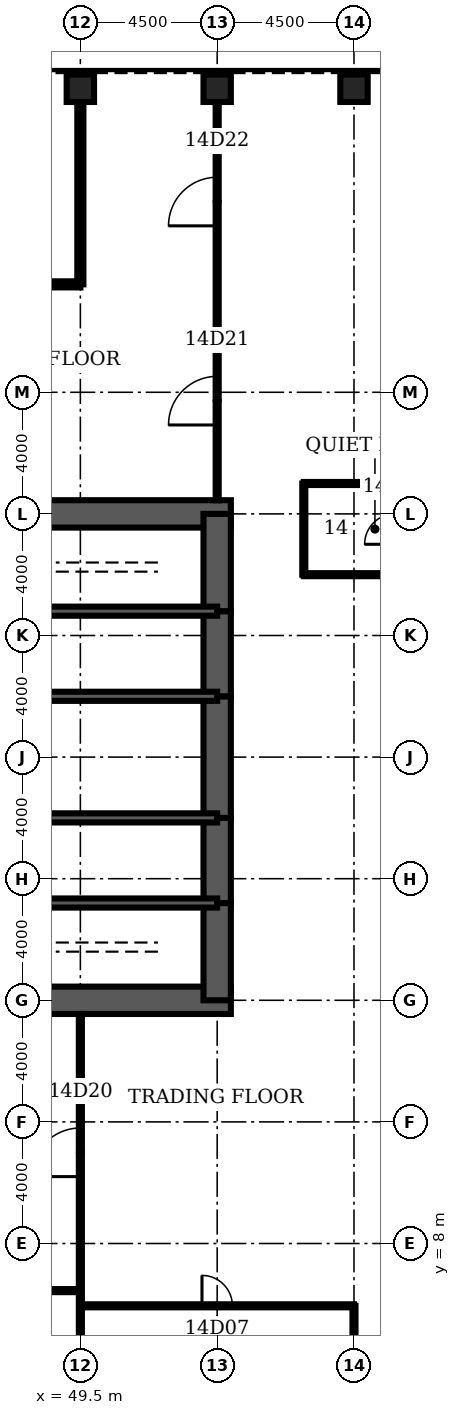
"""IFC4 building model, lengths in metres.
Left out: names, types, materials, properties, quantities, classifications, styles, units other than length and angle.
Written with IfcOpenShell. Run it as: python <this file> out.ifc"""

import sys

from ifc_helpers import new_model, si_unit, direction, frame, frame_2d, origin, origin_2d, place, context, subcontext, project, spatial, rectangle, hollow_rectangle, extrude, element, fill, save


model = new_model("IFC4")
c1 = context("Model", 3, precision=1e-05, world=origin(), true_north=direction((0.0, 1.0)))
c2 = subcontext(c1, "Body", "Model", "MODEL_VIEW")
j1 = project(units=[si_unit("LENGTHUNIT", "METRE"), si_unit("PLANEANGLEUNIT", "RADIAN")], contexts=[c1])
p1 = place(None, origin())
s1 = spatial("IfcSite", under=j1, at=p1, CompositionType="ELEMENT")
p2 = place(p1, origin())
s2 = spatial("IfcBuilding", under=s1, at=p2, CompositionType="ELEMENT")
p3 = place(p2, frame((0.0, 0.0, 68.0)))
s3 = spatial("IfcBuildingStorey", under=s2, at=p3, CompositionType="ELEMENT", Elevation=68.0)
for number, where, z_axis, x_axis in (
    (1, (58.5, 46.0, 0.0), (0.0, 0.0, 1.0), (0.0, 1.0, 0.0)),
    (2, (54.0, 46.0, 0.0), (0.0, 0.0, 1.0), (0.0, 1.0, 0.0)),
    (3, (49.5, 46.0, 0.0), (0.0, 0.0, 1.0), (0.0, 1.0, 0.0)),
):
    element("IfcColumn", number, at=place(p3, frame(where, z_axis=z_axis, x_axis=x_axis)), inside=s3, PredefinedType="COLUMN", context=c2, shape_type="SweptSolid", body=[
        extrude(hollow_rectangle(XDim=0.9, YDim=0.9, WallThickness=0.12, at=origin_2d()), origin(), (0.0, 0.0, 1.0), 4.5),
    ])
for number, where, z_axis, x_axis in (
    (4, (45.0, 16.0, 0.0), (0.0, 0.0, 1.0), (1.0, 0.0, 0.0)),
    (5, (54.45, 32.0, 0.0), (0.0, 0.0, 1.0), (-1.0, 0.0, 0.0)),
):
    element("IfcWall", number, at=place(p3, frame(where, z_axis=z_axis, x_axis=x_axis)), inside=s3, PredefinedType="SHEAR", context=c2, shape_type="SweptSolid", body=[
        extrude(rectangle(XDim=9.45, YDim=0.9, at=frame_2d((4.725, 0.0))), origin(), (0.0, 0.0, 1.0), 4.5),
    ])
p4 = place(p3, frame((54.0, 16.0, 0.0), z_axis=(0.0, 0.0, 1.0), x_axis=(0.0, 1.0, 0.0)))
e6 = element("IfcWall", 6, at=p4, inside=s3, PredefinedType="SHEAR", context=c2, shape_type="SweptSolid", body=[
    extrude(rectangle(XDim=3.2, YDim=0.9, at=frame_2d((1.6, 0.0))), origin(), (0.0, 0.0, 1.0), 4.5),
])
p5 = place(p3, frame((54.0, 19.2, 0.0), z_axis=(0.0, 0.0, 1.0), x_axis=(0.0, 1.0, 0.0)))
e7 = element("IfcWall", 7, at=p5, inside=s3, PredefinedType="SHEAR", context=c2, shape_type="SweptSolid", body=[
    extrude(rectangle(XDim=2.8, YDim=0.9, at=frame_2d((1.4, 0.0))), origin(), (0.0, 0.0, 1.0), 4.5),
])
p6 = place(p5, frame((0.4, 0.0, 0.0)))
e8 = element("IfcOpeningElement", 8, at=p6, cuts=e7, PredefinedType="OPENING", context=c2, shape_type="SweptSolid", body=[
    extrude(rectangle(XDim=1.8, YDim=2.1, at=frame_2d((0.9, 1.05))), frame((0.0, 0.46, 0.0), z_axis=(0.0, -1.0, 0.0), x_axis=(1.0, 0.0, 0.0)), (0.0, 0.0, 1.0), 0.92),
])
p7 = place(p3, frame((54.0, 22.0, 0.0), z_axis=(0.0, 0.0, 1.0), x_axis=(0.0, 1.0, 0.0)))
e9 = element("IfcWall", 9, at=p7, inside=s3, PredefinedType="SHEAR", context=c2, shape_type="SweptSolid", body=[
    extrude(rectangle(XDim=4.0, YDim=0.9, at=frame_2d((2.0, 0.0))), origin(), (0.0, 0.0, 1.0), 4.5),
])
p8 = place(p3, frame((54.0, 26.0, 0.0), z_axis=(0.0, 0.0, 1.0), x_axis=(0.0, 1.0, 0.0)))
e10 = element("IfcWall", 10, at=p8, inside=s3, PredefinedType="SHEAR", context=c2, shape_type="SweptSolid", body=[
    extrude(rectangle(XDim=2.8, YDim=0.9, at=frame_2d((1.4, 0.0))), origin(), (0.0, 0.0, 1.0), 4.5),
])
p9 = place(p8, frame((0.6, 0.0, 0.0)))
e11 = element("IfcOpeningElement", 11, at=p9, cuts=e10, PredefinedType="OPENING", context=c2, shape_type="SweptSolid", body=[
    extrude(rectangle(XDim=1.8, YDim=2.1, at=frame_2d((0.9, 1.05))), frame((0.0, 0.46, 0.0), z_axis=(0.0, -1.0, 0.0), x_axis=(1.0, 0.0, 0.0)), (0.0, 0.0, 1.0), 0.92),
])
p10 = place(p3, frame((54.0, 28.8, 0.0), z_axis=(0.0, 0.0, 1.0), x_axis=(0.0, 1.0, 0.0)))
e12 = element("IfcWall", 12, at=p10, inside=s3, PredefinedType="SHEAR", context=c2, shape_type="SweptSolid", body=[
    extrude(rectangle(XDim=3.2, YDim=0.9, at=frame_2d((1.6, 0.0))), origin(), (0.0, 0.0, 1.0), 4.5),
])
p11 = place(p3, frame((45.0, 19.2, 0.0), z_axis=(0.0, 0.0, 1.0), x_axis=(1.0, 0.0, 0.0)))
e13 = element("IfcWall", 13, at=p11, inside=s3, PredefinedType="SOLIDWALL", context=c2, shape_type="SweptSolid", body=[
    extrude(rectangle(XDim=9.0, YDim=0.3, at=frame_2d((4.5, 0.0))), origin(), (0.0, 0.0, 1.0), 4.5),
])
p12 = place(p11, frame((7.35, 0.0, 0.0)))
e14 = element("IfcOpeningElement", 14, at=p12, cuts=e13, PredefinedType="OPENING", context=c2, shape_type="SweptSolid", body=[
    extrude(rectangle(XDim=1.0, YDim=2.1, at=frame_2d((0.5, 1.05))), frame((0.0, 0.16, 0.0), z_axis=(0.0, -1.0, 0.0), x_axis=(1.0, 0.0, 0.0)), (0.0, 0.0, 1.0), 0.32),
])
p13 = place(p3, frame((45.0, 28.8, 0.0), z_axis=(0.0, 0.0, 1.0), x_axis=(1.0, 0.0, 0.0)))
e15 = element("IfcWall", 15, at=p13, inside=s3, PredefinedType="SOLIDWALL", context=c2, shape_type="SweptSolid", body=[
    extrude(rectangle(XDim=9.0, YDim=0.3, at=frame_2d((4.5, 0.0))), origin(), (0.0, 0.0, 1.0), 4.5),
])
p14 = place(p13, frame((7.35, 0.0, 0.0)))
e16 = element("IfcOpeningElement", 16, at=p14, cuts=e15, PredefinedType="OPENING", context=c2, shape_type="SweptSolid", body=[
    extrude(rectangle(XDim=1.0, YDim=2.1, at=frame_2d((0.5, 1.05))), frame((0.0, 0.16, 0.0), z_axis=(0.0, -1.0, 0.0), x_axis=(1.0, 0.0, 0.0)), (0.0, 0.0, 1.0), 0.32),
])
p15 = place(p3, frame((48.0, 22.0, 0.0), z_axis=(0.0, 0.0, 1.0), x_axis=(1.0, 0.0, 0.0)))
e17 = element("IfcWall", 17, at=p15, inside=s3, PredefinedType="SOLIDWALL", context=c2, shape_type="SweptSolid", body=[
    extrude(rectangle(XDim=6.0, YDim=0.3, at=frame_2d((3.0, 0.0))), origin(), (0.0, 0.0, 1.0), 4.5),
])
p16 = place(p15, frame((2.0, 0.0, 0.0)))
e18 = element("IfcOpeningElement", 18, at=p16, cuts=e17, PredefinedType="OPENING", context=c2, shape_type="SweptSolid", body=[
    extrude(rectangle(XDim=1.0, YDim=2.1, at=frame_2d((0.5, 1.05))), frame((0.0, 0.16, 0.0), z_axis=(0.0, -1.0, 0.0), x_axis=(1.0, 0.0, 0.0)), (0.0, 0.0, 1.0), 0.32),
])
p17 = place(p15, frame((4.0, 0.0, 0.0)))
e19 = element("IfcOpeningElement", 19, at=p17, cuts=e17, PredefinedType="OPENING", context=c2, shape_type="SweptSolid", body=[
    extrude(rectangle(XDim=1.0, YDim=2.1, at=frame_2d((0.5, 1.05))), frame((0.0, 0.16, 0.0), z_axis=(0.0, -1.0, 0.0), x_axis=(1.0, 0.0, 0.0)), (0.0, 0.0, 1.0), 0.32),
])
p18 = place(p3, frame((48.0, 26.0, 0.0), z_axis=(0.0, 0.0, 1.0), x_axis=(1.0, 0.0, 0.0)))
e20 = element("IfcWall", 20, at=p18, inside=s3, PredefinedType="SOLIDWALL", context=c2, shape_type="SweptSolid", body=[
    extrude(rectangle(XDim=6.0, YDim=0.3, at=frame_2d((3.0, 0.0))), origin(), (0.0, 0.0, 1.0), 4.5),
])
p19 = place(p3, frame((51.375, 22.15, 0.0), z_axis=(0.0, 0.0, 1.0), x_axis=(0.0, 1.0, 0.0)))
e21 = element("IfcWall", 21, at=p19, inside=s3, PredefinedType="PARTITIONING", context=c2, shape_type="SweptSolid", body=[
    extrude(rectangle(XDim=3.7, YDim=0.15, at=frame_2d((1.85, 0.0))), origin(), (0.0, 0.0, 1.0), 3.0),
])
p20 = place(p3, frame((49.5, 5.95, 0.0), z_axis=(0.0, 0.0, 1.0), x_axis=(1.0, 0.0, 0.0)))
e22 = element("IfcWall", 22, at=p20, inside=s3, PredefinedType="PARTITIONING", context=c2, shape_type="SweptSolid", body=[
    extrude(rectangle(XDim=9.0, YDim=0.1, at=frame_2d((4.5, 0.0))), origin(), (0.0, 0.0, 1.0), 3.0),
])
p21 = place(p20, frame((4.0, 0.0, 0.0)))
e23 = element("IfcOpeningElement", 23, at=p21, cuts=e22, PredefinedType="OPENING", context=c2, shape_type="SweptSolid", body=[
    extrude(rectangle(XDim=1.0, YDim=2.1, at=frame_2d((0.5, 1.05))), frame((0.0, 0.06, 0.0), z_axis=(0.0, -1.0, 0.0), x_axis=(1.0, 0.0, 0.0)), (0.0, 0.0, 1.0), 0.12),
])
p22 = place(p3, frame((36.0, 6.45, 0.0), z_axis=(0.0, 0.0, 1.0), x_axis=(1.0, 0.0, 0.0)))
e24 = element("IfcWall", 24, at=p22, inside=s3, PredefinedType="PARTITIONING", context=c2, shape_type="SweptSolid", body=[
    extrude(rectangle(XDim=13.5, YDim=0.1, at=frame_2d((6.75, 0.0))), origin(), (0.0, 0.0, 1.0), 3.0),
])
p23 = place(p22, frame((5.95, 0.0, 0.0)))
e25 = element("IfcOpeningElement", 25, at=p23, cuts=e24, PredefinedType="OPENING", context=c2, shape_type="SweptSolid", body=[
    extrude(rectangle(XDim=1.6, YDim=2.1, at=frame_2d((0.8, 1.05))), frame((0.0, 0.06, 0.0), z_axis=(0.0, -1.0, 0.0), x_axis=(1.0, 0.0, 0.0)), (0.0, 0.0, 1.0), 0.12),
])
for number, where, z_axis, x_axis in (
    (26, (56.85, 30.0, 0.0), (0.0, 0.0, 1.0), (1.0, 0.0, 0.0)),
    (27, (56.85, 33.0, 0.0), (0.0, 0.0, 1.0), (1.0, 0.0, 0.0)),
):
    element("IfcWall", number, at=place(p3, frame(where, z_axis=z_axis, x_axis=x_axis)), inside=s3, PredefinedType="PARTITIONING", context=c2, shape_type="SweptSolid", body=[
        extrude(rectangle(XDim=3.0, YDim=0.1, at=frame_2d((1.5, 0.0))), origin(), (0.0, 0.0, 1.0), 3.0),
    ])
p24 = place(p3, frame((40.5, 39.55, 0.0), z_axis=(0.0, 0.0, 1.0), x_axis=(1.0, 0.0, 0.0)))
e28 = element("IfcWall", 28, at=p24, inside=s3, PredefinedType="PARTITIONING", context=c2, shape_type="SweptSolid", body=[
    extrude(rectangle(XDim=9.0, YDim=0.2, at=frame_2d((4.5, 0.0))), origin(), (0.0, 0.0, 1.0), 3.0),
])
p25 = place(p24, frame((3.7, 0.0, 0.0)))
e29 = element("IfcOpeningElement", 29, at=p25, cuts=e28, PredefinedType="OPENING", context=c2, shape_type="SweptSolid", body=[
    extrude(rectangle(XDim=1.6, YDim=2.1, at=frame_2d((0.8, 1.05))), frame((0.0, 0.11, 0.0), z_axis=(0.0, -1.0, 0.0), x_axis=(1.0, 0.0, 0.0)), (0.0, 0.0, 1.0), 0.22),
])
p26 = place(p3, frame((49.5, 0.45, 0.0), z_axis=(0.0, 0.0, 1.0), x_axis=(0.0, 1.0, 0.0)))
e30 = element("IfcWall", 30, at=p26, inside=s3, PredefinedType="PARTITIONING", context=c2, shape_type="SweptSolid", body=[
    extrude(rectangle(XDim=15.1, YDim=0.1, at=frame_2d((7.55, 0.0))), origin(), (0.0, 0.0, 1.0), 3.0),
])
p27 = place(p26, frame((9.75, 0.0, 0.0)))
e31 = element("IfcOpeningElement", 31, at=p27, cuts=e30, PredefinedType="OPENING", context=c2, shape_type="SweptSolid", body=[
    extrude(rectangle(XDim=1.6, YDim=2.1, at=frame_2d((0.8, 1.05))), frame((0.0, 0.06, 0.0), z_axis=(0.0, -1.0, 0.0), x_axis=(1.0, 0.0, 0.0)), (0.0, 0.0, 1.0), 0.12),
])
p28 = place(p3, frame((49.5, 39.55, 0.0), z_axis=(0.0, 0.0, 1.0), x_axis=(0.0, 1.0, 0.0)))
e32 = element("IfcWall", 32, at=p28, inside=s3, PredefinedType="PARTITIONING", context=c2, shape_type="SweptSolid", body=[
    extrude(rectangle(XDim=6.0, YDim=0.2, at=frame_2d((3.0, 0.0))), origin(), (0.0, 0.0, 1.0), 3.0),
])
p29 = place(p3, frame((54.0, 32.45, 0.0), z_axis=(0.0, 0.0, 1.0), x_axis=(0.0, 1.0, 0.0)))
e33 = element("IfcWall", 33, at=p29, inside=s3, PredefinedType="PARTITIONING", context=c2, shape_type="SweptSolid", body=[
    extrude(rectangle(XDim=13.1, YDim=0.1, at=frame_2d((6.55, 0.0))), origin(), (0.0, 0.0, 1.0), 3.0),
])
p30 = place(p29, frame((2.475, 0.0, 0.0)))
e34 = element("IfcOpeningElement", 34, at=p30, cuts=e33, PredefinedType="OPENING", context=c2, shape_type="SweptSolid", body=[
    extrude(rectangle(XDim=1.6, YDim=2.1, at=frame_2d((0.8, 1.05))), frame((0.0, 0.06, 0.0), z_axis=(0.0, -1.0, 0.0), x_axis=(1.0, 0.0, 0.0)), (0.0, 0.0, 1.0), 0.12),
])
p31 = place(p29, frame((9.025, 0.0, 0.0)))
e35 = element("IfcOpeningElement", 35, at=p31, cuts=e33, PredefinedType="OPENING", context=c2, shape_type="SweptSolid", body=[
    extrude(rectangle(XDim=1.6, YDim=2.1, at=frame_2d((0.8, 1.05))), frame((0.0, 0.06, 0.0), z_axis=(0.0, -1.0, 0.0), x_axis=(1.0, 0.0, 0.0)), (0.0, 0.0, 1.0), 0.12),
])
p32 = place(p3, frame((56.85, 30.0, 0.0), z_axis=(0.0, 0.0, 1.0), x_axis=(0.0, 1.0, 0.0)))
e36 = element("IfcWall", 36, at=p32, inside=s3, PredefinedType="PARTITIONING", context=c2, shape_type="SweptSolid", body=[
    extrude(rectangle(XDim=3.0, YDim=0.1, at=frame_2d((1.5, 0.0))), origin(), (0.0, 0.0, 1.0), 3.0),
])
p33 = place(p3, frame((58.5, 0.45, 0.0), z_axis=(0.0, 0.0, 1.0), x_axis=(0.0, 1.0, 0.0)))
e37 = element("IfcWall", 37, at=p33, inside=s3, PredefinedType="PARTITIONING", context=c2, shape_type="SweptSolid", body=[
    extrude(rectangle(XDim=5.5, YDim=0.1, at=frame_2d((2.75, 0.0))), origin(), (0.0, 0.0, 1.0), 3.0),
])
p34 = place(p21, origin())
e38 = element("IfcDoor", 38, at=p34, inside=s3, OperationType="SINGLE_SWING_LEFT", PredefinedType="DOOR", context=c2, shape_type="SweptSolid", body=[
    extrude(rectangle(XDim=1.0, YDim=2.1, at=frame_2d((0.5, 1.05))), frame((0.0, 0.025, 0.0), z_axis=(0.0, -1.0, 0.0), x_axis=(1.0, 0.0, 0.0)), (0.0, 0.0, 1.0), 0.05),
])
fill(e23, e38)
p35 = place(p27, origin())
e39 = element("IfcDoor", 39, at=p35, inside=s3, OperationType="SINGLE_SWING_LEFT", PredefinedType="DOOR", context=c2, shape_type="SweptSolid", body=[
    extrude(rectangle(XDim=1.6, YDim=2.1, at=frame_2d((0.8, 1.05))), frame((0.0, 0.025, 0.0), z_axis=(0.0, -1.0, 0.0), x_axis=(1.0, 0.0, 0.0)), (0.0, 0.0, 1.0), 0.05),
])
fill(e31, e39)
p36 = place(p30, origin())
e40 = element("IfcDoor", 40, at=p36, inside=s3, OperationType="SINGLE_SWING_LEFT", PredefinedType="DOOR", context=c2, shape_type="SweptSolid", body=[
    extrude(rectangle(XDim=1.6, YDim=2.1, at=frame_2d((0.8, 1.05))), frame((0.0, 0.025, 0.0), z_axis=(0.0, -1.0, 0.0), x_axis=(1.0, 0.0, 0.0)), (0.0, 0.0, 1.0), 0.05),
])
fill(e34, e40)
p37 = place(p31, origin())
e41 = element("IfcDoor", 41, at=p37, inside=s3, OperationType="SINGLE_SWING_LEFT", PredefinedType="DOOR", context=c2, shape_type="SweptSolid", body=[
    extrude(rectangle(XDim=1.6, YDim=2.1, at=frame_2d((0.8, 1.05))), frame((0.0, 0.025, 0.0), z_axis=(0.0, -1.0, 0.0), x_axis=(1.0, 0.0, 0.0)), (0.0, 0.0, 1.0), 0.05),
])
fill(e35, e41)
p38 = place(p12, origin())
e42 = element("IfcDoor", 42, at=p38, inside=s3, OperationType="SINGLE_SWING_RIGHT", PredefinedType="DOOR", context=c2, shape_type="SweptSolid", body=[
    extrude(rectangle(XDim=1.0, YDim=2.1, at=frame_2d((0.5, 1.05))), frame((0.0, 0.025, 0.0), z_axis=(0.0, -1.0, 0.0), x_axis=(1.0, 0.0, 0.0)), (0.0, 0.0, 1.0), 0.05),
])
fill(e14, e42)
p39 = place(p14, origin())
e43 = element("IfcDoor", 43, at=p39, inside=s3, OperationType="SINGLE_SWING_RIGHT", PredefinedType="DOOR", context=c2, shape_type="SweptSolid", body=[
    extrude(rectangle(XDim=1.0, YDim=2.1, at=frame_2d((0.5, 1.05))), frame((0.0, 0.025, 0.0), z_axis=(0.0, -1.0, 0.0), x_axis=(1.0, 0.0, 0.0)), (0.0, 0.0, 1.0), 0.05),
])
fill(e16, e43)
p40 = place(p6, origin())
e44 = element("IfcDoor", 44, at=p40, inside=s3, OperationType="SINGLE_SWING_LEFT", PredefinedType="DOOR", context=c2, shape_type="SweptSolid", body=[
    extrude(rectangle(XDim=1.8, YDim=2.1, at=frame_2d((0.9, 1.05))), frame((0.0, 0.45, 0.0), z_axis=(0.0, -1.0, 0.0), x_axis=(1.0, 0.0, 0.0)), (0.0, 0.0, 1.0), 0.899),
])
fill(e8, e44)
p41 = place(p9, origin())
e45 = element("IfcDoor", 45, at=p41, inside=s3, OperationType="SINGLE_SWING_LEFT", PredefinedType="DOOR", context=c2, shape_type="SweptSolid", body=[
    extrude(rectangle(XDim=1.8, YDim=2.1, at=frame_2d((0.9, 1.05))), frame((0.0, 0.45, 0.0), z_axis=(0.0, -1.0, 0.0), x_axis=(1.0, 0.0, 0.0)), (0.0, 0.0, 1.0), 0.899),
])
fill(e11, e45)
p42 = place(p16, origin())
e46 = element("IfcDoor", 46, at=p42, inside=s3, OperationType="SINGLE_SWING_LEFT", PredefinedType="DOOR", context=c2, shape_type="SweptSolid", body=[
    extrude(rectangle(XDim=1.0, YDim=2.1, at=frame_2d((0.5, 1.05))), frame((0.0, 0.025, 0.0), z_axis=(0.0, -1.0, 0.0), x_axis=(1.0, 0.0, 0.0)), (0.0, 0.0, 1.0), 0.05),
])
fill(e18, e46)
p43 = place(p17, origin())
e47 = element("IfcDoor", 47, at=p43, inside=s3, OperationType="SINGLE_SWING_RIGHT", PredefinedType="DOOR", context=c2, shape_type="SweptSolid", body=[
    extrude(rectangle(XDim=1.0, YDim=2.1, at=frame_2d((0.5, 1.05))), frame((0.0, 0.025, 0.0), z_axis=(0.0, -1.0, 0.0), x_axis=(1.0, 0.0, 0.0)), (0.0, 0.0, 1.0), 0.05),
])
fill(e19, e47)
save(model, sys.argv[1])
